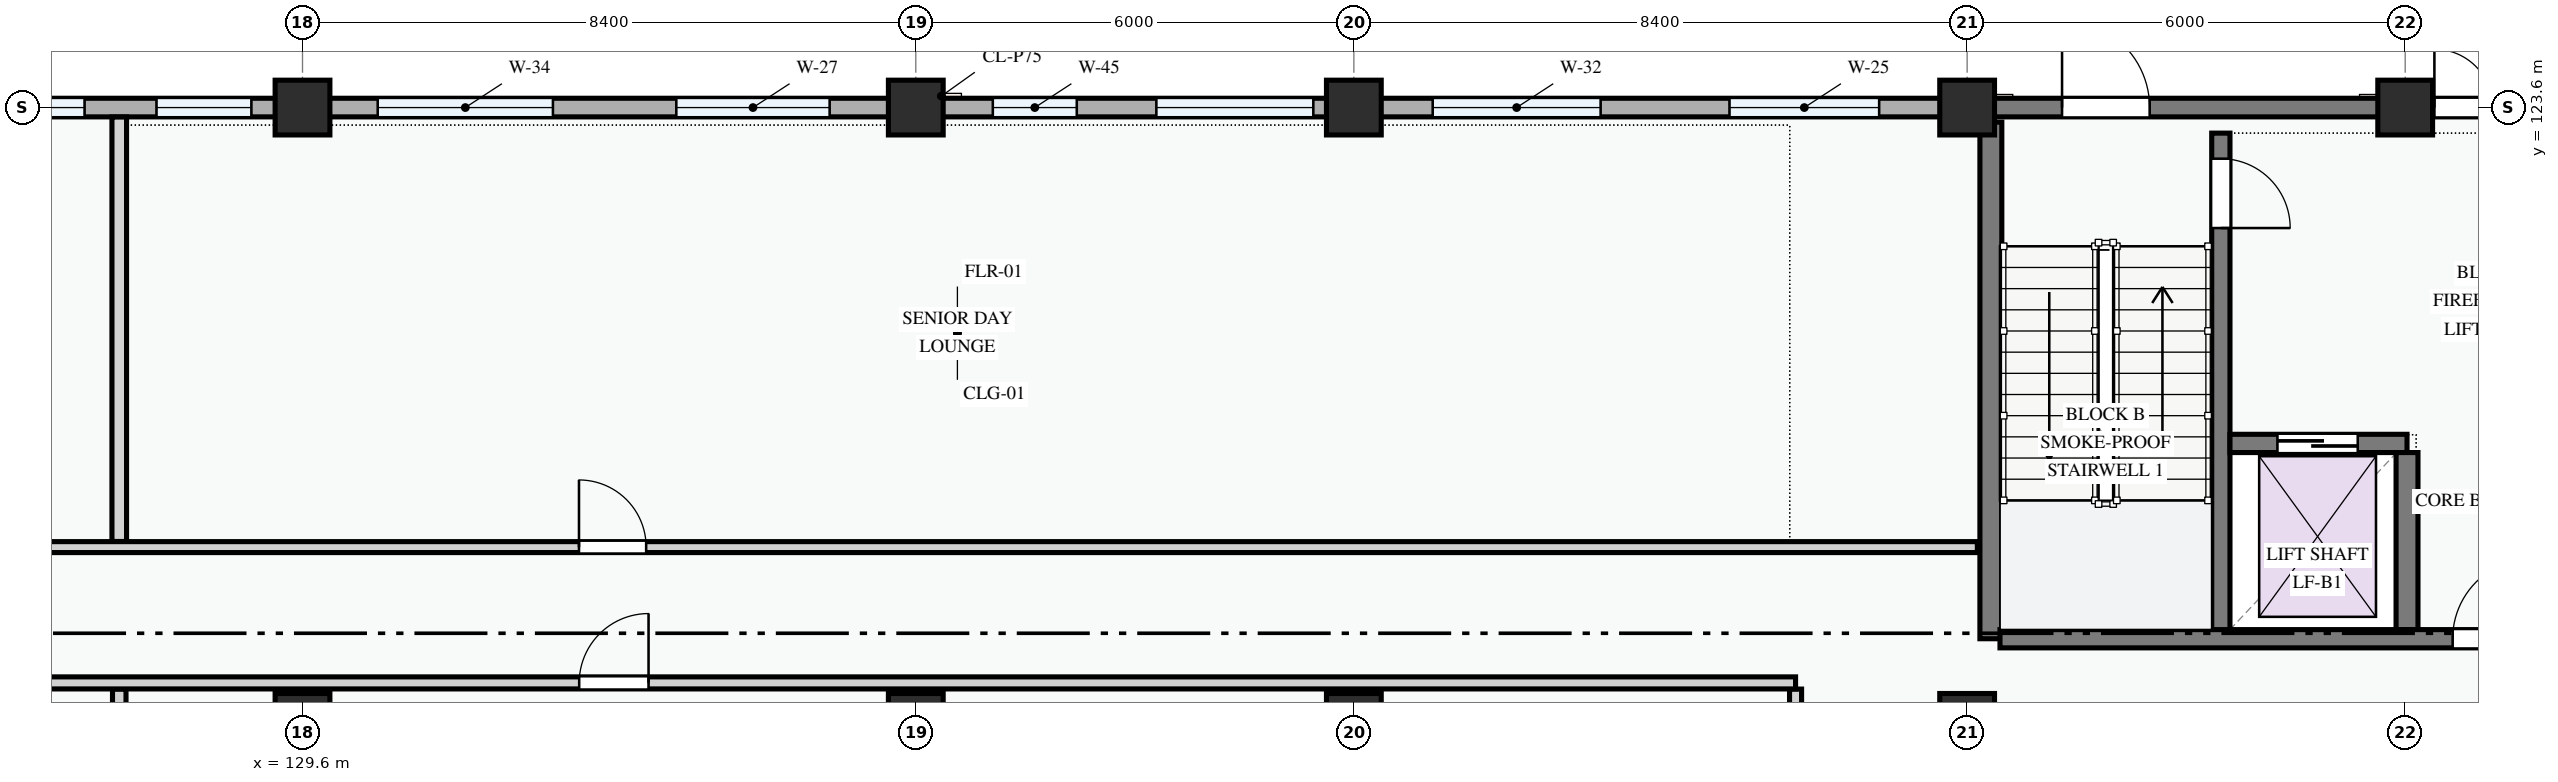
"""IFC4 building model, lengths in metres.
Left out: names, types, materials, properties, quantities, classifications, styles, units other than length and angle.
Written with IfcOpenShell. Run it as: python <this file> out.ifc"""

import sys

from ifc_helpers import new_model, si_unit, direction, frame, frame_2d, origin, origin_2d, place, context, subcontext, project, spatial, rectangle, extrude, element, fill, save


model = new_model("IFC4")
c1 = context("Model", 3, precision=1e-05, world=origin(), true_north=direction((0.0, 1.0)))
c2 = subcontext(c1, "Body", "Model", "MODEL_VIEW")
j1 = project(units=[si_unit("LENGTHUNIT", "METRE"), si_unit("PLANEANGLEUNIT", "RADIAN")], contexts=[c1])
p1 = place(None, origin())
s1 = spatial("IfcSite", under=j1, at=p1, CompositionType="ELEMENT")
p2 = place(p1, origin())
s2 = spatial("IfcBuilding", under=s1, at=p2, CompositionType="ELEMENT")
p3 = place(p2, origin())
s3 = spatial("IfcBuildingStorey", under=s2, at=p3, CompositionType="ELEMENT", Elevation=0.0)
for number, where, z_axis, x_axis in (
    (1, (129.6, 115.2, 0.0), (0.0, 0.0, 1.0), (1.0, 0.0, 0.0)),
    (2, (129.6, 123.6, 0.0), (0.0, 0.0, 1.0), (1.0, 0.0, 0.0)),
    (3, (138.0, 115.2, 0.0), (0.0, 0.0, 1.0), (1.0, 0.0, 0.0)),
    (4, (138.0, 123.6, 0.0), (0.0, 0.0, 1.0), (1.0, 0.0, 0.0)),
    (5, (144.0, 115.2, 0.0), (0.0, 0.0, 1.0), (1.0, 0.0, 0.0)),
    (6, (144.0, 123.6, 0.0), (0.0, 0.0, 1.0), (1.0, 0.0, 0.0)),
    (7, (152.4, 115.2, 0.0), (0.0, 0.0, 1.0), (1.0, 0.0, 0.0)),
    (8, (152.4, 123.6, 0.0), (0.0, 0.0, 1.0), (1.0, 0.0, 0.0)),
    (9, (158.4, 123.6, 0.0), (0.0, 0.0, 1.0), (1.0, 0.0, 0.0)),
):
    element("IfcColumn", number, at=place(p3, frame(where, z_axis=z_axis, x_axis=x_axis)), inside=s3, PredefinedType="COLUMN", context=c2, shape_type="SweptSolid", body=[
        extrude(rectangle(XDim=0.75, YDim=0.75, at=origin_2d()), origin(), (0.0, 0.0, 1.0), 4.5),
    ])
p4 = place(p3, frame((166.8, 123.6, 0.0), z_axis=(0.0, 0.0, 1.0), x_axis=(-1.0, 0.0, 0.0)))
e10 = element("IfcWall", 10, at=p4, inside=s3, PredefinedType="STANDARD", context=c2, shape_type="SweptSolid", body=[
    extrude(rectangle(XDim=8.4, YDim=0.255, at=frame_2d((4.2, 0.0))), origin(), (0.0, 0.0, 1.0), 4.2),
])
p5 = place(p4, frame((6.4, 0.0, 0.0)))
e11 = element("IfcOpeningElement", 11, at=p5, cuts=e10, PredefinedType="OPENING", context=c2, shape_type="SweptSolid", body=[
    extrude(rectangle(XDim=1.6, YDim=2.35, at=frame_2d((0.8, 1.175))), frame((0.0, 0.137, 0.0), z_axis=(0.0, -1.0, 0.0), x_axis=(1.0, 0.0, 0.0)), (0.0, 0.0, 1.0), 0.275),
])
p6 = place(p4, frame((1.25, 0.0, 0.0)))
e12 = element("IfcOpeningElement", 12, at=p6, cuts=e10, PredefinedType="OPENING", context=c2, shape_type="SweptSolid", body=[
    extrude(rectangle(XDim=1.3, YDim=2.2, at=frame_2d((0.65, 1.1))), frame((0.0, 0.137, 0.0), z_axis=(0.0, -1.0, 0.0), x_axis=(1.0, 0.0, 0.0)), (0.0, 0.0, 1.0), 0.275),
])
p7 = place(p3, frame((158.4, 123.6, 0.0), z_axis=(0.0, 0.0, 1.0), x_axis=(-1.0, 0.0, 0.0)))
e13 = element("IfcWall", 13, at=p7, inside=s3, PredefinedType="STANDARD", context=c2, shape_type="SweptSolid", body=[
    extrude(rectangle(XDim=6.0, YDim=0.255, at=frame_2d((3.0, 0.0))), origin(), (0.0, 0.0, 1.0), 4.2),
])
p8 = place(p7, frame((3.5, 0.0, 0.0)))
e14 = element("IfcOpeningElement", 14, at=p8, cuts=e13, PredefinedType="OPENING", context=c2, shape_type="SweptSolid", body=[
    extrude(rectangle(XDim=1.2, YDim=2.2, at=frame_2d((0.6, 1.1))), frame((0.0, 0.137, 0.0), z_axis=(0.0, -1.0, 0.0), x_axis=(1.0, 0.0, 0.0)), (0.0, 0.0, 1.0), 0.275),
])
p9 = place(p3, frame((152.4, 123.6, 0.0), z_axis=(0.0, 0.0, 1.0), x_axis=(-1.0, 0.0, 0.0)))
e15 = element("IfcWall", 15, at=p9, inside=s3, PredefinedType="STANDARD", context=c2, shape_type="SweptSolid", body=[
    extrude(rectangle(XDim=8.4, YDim=0.255, at=frame_2d((4.2, 0.0))), origin(), (0.0, 0.0, 1.0), 3.485),
])
p10 = place(p9, frame((1.205, 0.0, 0.78)))
e16 = element("IfcOpeningElement", 16, at=p10, cuts=e15, PredefinedType="OPENING", context=c2, shape_type="SweptSolid", body=[
    extrude(rectangle(XDim=2.05, YDim=1.6, at=frame_2d((1.025, 0.8))), frame((0.0, 0.137, 0.0), z_axis=(0.0, -1.0, 0.0), x_axis=(1.0, 0.0, 0.0)), (0.0, 0.0, 1.0), 0.275),
])
p11 = place(p9, frame((5.02, 0.0, 0.78)))
e17 = element("IfcOpeningElement", 17, at=p11, cuts=e15, PredefinedType="OPENING", context=c2, shape_type="SweptSolid", body=[
    extrude(rectangle(XDim=2.3, YDim=1.7, at=frame_2d((1.15, 0.85))), frame((0.0, 0.137, 0.0), z_axis=(0.0, -1.0, 0.0), x_axis=(1.0, 0.0, 0.0)), (0.0, 0.0, 1.0), 0.275),
])
p12 = place(p3, frame((144.0, 123.6, 0.0), z_axis=(0.0, 0.0, 1.0), x_axis=(-1.0, 0.0, 0.0)))
e18 = element("IfcWall", 18, at=p12, inside=s3, PredefinedType="STANDARD", context=c2, shape_type="SweptSolid", body=[
    extrude(rectangle(XDim=6.0, YDim=0.255, at=frame_2d((3.0, 0.0))), origin(), (0.0, 0.0, 1.0), 3.585),
])
p13 = place(p12, frame((0.555, 0.0, 0.78)))
e19 = element("IfcOpeningElement", 19, at=p13, cuts=e18, PredefinedType="OPENING", context=c2, shape_type="SweptSolid", body=[
    extrude(rectangle(XDim=2.15, YDim=1.65, at=frame_2d((1.075, 0.825))), frame((0.0, 0.137, 0.0), z_axis=(0.0, -1.0, 0.0), x_axis=(1.0, 0.0, 0.0)), (0.0, 0.0, 1.0), 0.275),
])
p14 = place(p12, frame((3.795, 0.0, 0.78)))
e20 = element("IfcOpeningElement", 20, at=p14, cuts=e18, PredefinedType="OPENING", context=c2, shape_type="SweptSolid", body=[
    extrude(rectangle(XDim=1.15, YDim=1.25, at=frame_2d((0.575, 0.625))), frame((0.0, 0.137, 0.0), z_axis=(0.0, -1.0, 0.0), x_axis=(1.0, 0.0, 0.0)), (0.0, 0.0, 1.0), 0.275),
])
p15 = place(p3, frame((138.0, 123.6, 0.0), z_axis=(0.0, 0.0, 1.0), x_axis=(-1.0, 0.0, 0.0)))
e21 = element("IfcWall", 21, at=p15, inside=s3, PredefinedType="STANDARD", context=c2, shape_type="SweptSolid", body=[
    extrude(rectangle(XDim=8.4, YDim=0.255, at=frame_2d((4.2, 0.0))), origin(), (0.0, 0.0, 1.0), 3.485),
])
p16 = place(p15, frame((1.18, 0.0, 0.78)))
e22 = element("IfcOpeningElement", 22, at=p16, cuts=e21, PredefinedType="OPENING", context=c2, shape_type="SweptSolid", body=[
    extrude(rectangle(XDim=2.1, YDim=1.8, at=frame_2d((1.05, 0.9))), frame((0.0, 0.137, 0.0), z_axis=(0.0, -1.0, 0.0), x_axis=(1.0, 0.0, 0.0)), (0.0, 0.0, 1.0), 0.275),
])
p17 = place(p15, frame((4.97, 0.0, 0.78)))
e23 = element("IfcOpeningElement", 23, at=p17, cuts=e21, PredefinedType="OPENING", context=c2, shape_type="SweptSolid", body=[
    extrude(rectangle(XDim=2.4, YDim=1.65, at=frame_2d((1.2, 0.825))), frame((0.0, 0.137, 0.0), z_axis=(0.0, -1.0, 0.0), x_axis=(1.0, 0.0, 0.0)), (0.0, 0.0, 1.0), 0.275),
])
p18 = place(p3, frame((129.6, 123.6, 0.0), z_axis=(0.0, 0.0, 1.0), x_axis=(-1.0, 0.0, 0.0)))
e24 = element("IfcWall", 24, at=p18, inside=s3, PredefinedType="STANDARD", context=c2, shape_type="SweptSolid", body=[
    extrude(rectangle(XDim=6.0, YDim=0.255, at=frame_2d((3.0, 0.0))), origin(), (0.0, 0.0, 1.0), 3.585),
])
p19 = place(p18, frame((0.7, 0.0, 0.78)))
e25 = element("IfcOpeningElement", 25, at=p19, cuts=e24, PredefinedType="OPENING", context=c2, shape_type="SweptSolid", body=[
    extrude(rectangle(XDim=1.3, YDim=1.4, at=frame_2d((0.65, 0.7))), frame((0.0, 0.137, 0.0), z_axis=(0.0, -1.0, 0.0), x_axis=(1.0, 0.0, 0.0)), (0.0, 0.0, 1.0), 0.275),
])
p20 = place(p18, frame((2.985, 0.0, 0.78)))
e26 = element("IfcOpeningElement", 26, at=p20, cuts=e24, PredefinedType="OPENING", context=c2, shape_type="SweptSolid", body=[
    extrude(rectangle(XDim=2.35, YDim=1.55, at=frame_2d((1.175, 0.775))), frame((0.0, 0.137, 0.0), z_axis=(0.0, -1.0, 0.0), x_axis=(1.0, 0.0, 0.0)), (0.0, 0.0, 1.0), 0.275),
])
p21 = place(p3, frame((155.875, 123.25, 0.0), z_axis=(0.0, 0.0, 1.0), x_axis=(0.0, -1.0, 0.0)))
e27 = element("IfcWall", 27, at=p21, inside=s3, PredefinedType="SHEAR", context=c2, shape_type="SweptSolid", body=[
    extrude(rectangle(XDim=6.925, YDim=0.25, at=frame_2d((3.462, 0.0))), origin(), (0.0, 0.0, 1.0), 4.2),
])
p22 = place(p21, frame((0.35, 0.0, 0.0)))
e28 = element("IfcOpeningElement", 28, at=p22, cuts=e27, PredefinedType="OPENING", context=c2, shape_type="SweptSolid", body=[
    extrude(rectangle(XDim=0.95, YDim=2.1, at=frame_2d((0.475, 1.05))), frame((0.0, 0.135, 0.0), z_axis=(0.0, -1.0, 0.0), x_axis=(1.0, 0.0, 0.0)), (0.0, 0.0, 1.0), 0.27),
])
p23 = place(p3, frame((152.725, 123.4, 0.0), z_axis=(0.0, 0.0, 1.0), x_axis=(0.0, -1.0, 0.0)))
e29 = element("IfcWall", 29, at=p23, inside=s3, PredefinedType="SHEAR", context=c2, shape_type="SweptSolid", body=[
    extrude(rectangle(XDim=7.075, YDim=0.3, at=frame_2d((3.538, 0.0))), origin(), (0.0, 0.0, 1.0), 4.2),
])
p24 = place(p3, frame((156.0, 119.0, 0.0), z_axis=(0.0, 0.0, 1.0), x_axis=(1.0, 0.0, 0.0)))
e30 = element("IfcWall", 30, at=p24, inside=s3, PredefinedType="SHEAR", context=c2, shape_type="SweptSolid", body=[
    extrude(rectangle(XDim=2.425, YDim=0.25, at=frame_2d((1.212, 0.0))), origin(), (0.0, 0.0, 1.0), 4.2),
])
p25 = place(p24, frame((0.65, 0.0, 0.0)))
e31 = element("IfcOpeningElement", 31, at=p25, cuts=e30, PredefinedType="OPENING", context=c2, shape_type="SweptSolid", body=[
    extrude(rectangle(XDim=1.1, YDim=2.15, at=frame_2d((0.55, 1.075))), frame((0.0, 0.135, 0.0), z_axis=(0.0, -1.0, 0.0), x_axis=(1.0, 0.0, 0.0)), (0.0, 0.0, 1.0), 0.27),
])
p26 = place(p3, frame((158.425, 118.875, 0.0), z_axis=(0.0, 0.0, 1.0), x_axis=(0.0, -1.0, 0.0)))
e32 = element("IfcWall", 32, at=p26, inside=s3, PredefinedType="SHEAR", context=c2, shape_type="SweptSolid", body=[
    extrude(rectangle(XDim=2.425, YDim=0.3, at=frame_2d((1.212, 0.0))), origin(), (0.0, 0.0, 1.0), 4.2),
])
p27 = place(p3, frame((152.85, 116.325, 0.0), z_axis=(0.0, 0.0, 1.0), x_axis=(1.0, 0.0, 0.0)))
e33 = element("IfcWall", 33, at=p27, inside=s3, PredefinedType="SHEAR", context=c2, shape_type="SweptSolid", body=[
    extrude(rectangle(XDim=13.5, YDim=0.25, at=frame_2d((6.75, 0.0))), origin(), (0.0, 0.0, 1.0), 4.2),
])
p28 = place(p27, frame((6.2, 0.0, 0.0)))
e34 = element("IfcOpeningElement", 34, at=p28, cuts=e33, PredefinedType="OPENING", context=c2, shape_type="SweptSolid", body=[
    extrude(rectangle(XDim=1.1, YDim=2.15, at=frame_2d((0.55, 1.075))), frame((0.0, 0.135, 0.0), z_axis=(0.0, -1.0, 0.0), x_axis=(1.0, 0.0, 0.0)), (0.0, 0.0, 1.0), 0.27),
])
p29 = place(p3, frame((150.05, 109.33, 0.0), z_axis=(0.0, 0.0, 1.0), x_axis=(0.0, 1.0, 0.0)))
e35 = element("IfcWall", 35, at=p29, inside=s3, PredefinedType="PARTITIONING", context=c2, shape_type="SweptSolid", body=[
    extrude(rectangle(XDim=6.306, YDim=0.165, at=frame_2d((3.153, 0.0))), origin(), (0.0, 0.0, 1.0), 4.2),
])
p30 = place(p3, frame((127.09, 109.33, 0.0), z_axis=(0.0, 0.0, 1.0), x_axis=(0.0, 1.0, 0.0)))
e36 = element("IfcWall", 36, at=p30, inside=s3, PredefinedType="PARTITIONING", context=c2, shape_type="SweptSolid", body=[
    extrude(rectangle(XDim=6.306, YDim=0.185, at=frame_2d((3.153, 0.0))), origin(), (0.0, 0.0, 1.0), 4.2),
])
p31 = place(p3, frame((127.09, 117.657, 0.0), z_axis=(0.0, 0.0, 1.0), x_axis=(0.0, 1.0, 0.0)))
e37 = element("IfcWall", 37, at=p31, inside=s3, PredefinedType="PARTITIONING", context=c2, shape_type="SweptSolid", body=[
    extrude(rectangle(XDim=5.813, YDim=0.2, at=frame_2d((2.907, 0.0))), origin(), (0.0, 0.0, 1.0), 4.2),
])
p32 = place(p3, frame((80.53, 115.72, 0.0), z_axis=(0.0, 0.0, 1.0), x_axis=(1.0, 0.0, 0.0)))
e38 = element("IfcWall", 38, at=p32, inside=s3, PredefinedType="PARTITIONING", context=c2, shape_type="SweptSolid", body=[
    extrude(rectangle(XDim=69.521, YDim=0.165, at=frame_2d((34.76, 0.0))), origin(), (0.0, 0.0, 1.0), 4.2),
])
p33 = place(p32, frame((9.591, 0.0, 0.0)))
e39 = element("IfcOpeningElement", 39, at=p33, cuts=e38, PredefinedType="OPENING", context=c2, shape_type="SweptSolid", body=[
    extrude(rectangle(XDim=0.95, YDim=2.1, at=frame_2d((0.475, 1.05))), frame((0.0, 0.093, 0.0), z_axis=(0.0, -1.0, 0.0), x_axis=(1.0, 0.0, 0.0)), (0.0, 0.0, 1.0), 0.185),
])
p34 = place(p32, frame((38.417, 0.0, 0.0)))
e40 = element("IfcOpeningElement", 40, at=p34, cuts=e38, PredefinedType="OPENING", context=c2, shape_type="SweptSolid", body=[
    extrude(rectangle(XDim=0.95, YDim=2.1, at=frame_2d((0.475, 1.05))), frame((0.0, 0.093, 0.0), z_axis=(0.0, -1.0, 0.0), x_axis=(1.0, 0.0, 0.0)), (0.0, 0.0, 1.0), 0.185),
])
p35 = place(p32, frame((52.86, 0.0, 0.0)))
e41 = element("IfcOpeningElement", 41, at=p35, cuts=e38, PredefinedType="OPENING", context=c2, shape_type="SweptSolid", body=[
    extrude(rectangle(XDim=0.95, YDim=2.1, at=frame_2d((0.475, 1.05))), frame((0.0, 0.093, 0.0), z_axis=(0.0, -1.0, 0.0), x_axis=(1.0, 0.0, 0.0)), (0.0, 0.0, 1.0), 0.185),
])
p36 = place(p3, frame((80.53, 117.58, 0.0), z_axis=(0.0, 0.0, 1.0), x_axis=(1.0, 0.0, 0.0)))
e42 = element("IfcWall", 42, at=p36, inside=s3, PredefinedType="PARTITIONING", context=c2, shape_type="SweptSolid", body=[
    extrude(rectangle(XDim=72.01, YDim=0.15, at=frame_2d((36.005, 0.0))), origin(), (0.0, 0.0, 1.0), 4.2),
])
p37 = place(p36, frame((9.587, 0.0, 0.0)))
e43 = element("IfcOpeningElement", 43, at=p37, cuts=e42, PredefinedType="OPENING", context=c2, shape_type="SweptSolid", body=[
    extrude(rectangle(XDim=0.96, YDim=2.12, at=frame_2d((0.48, 1.06))), frame((0.0, 0.085, 0.0), z_axis=(0.0, -1.0, 0.0), x_axis=(1.0, 0.0, 0.0)), (0.0, 0.0, 1.0), 0.17),
])
p38 = place(p36, frame((38.41, 0.0, 0.0)))
e44 = element("IfcOpeningElement", 44, at=p38, cuts=e42, PredefinedType="OPENING", context=c2, shape_type="SweptSolid", body=[
    extrude(rectangle(XDim=0.92, YDim=2.1, at=frame_2d((0.46, 1.05))), frame((0.0, 0.085, 0.0), z_axis=(0.0, -1.0, 0.0), x_axis=(1.0, 0.0, 0.0)), (0.0, 0.0, 1.0), 0.17),
])
p39 = place(p36, frame((52.857, 0.0, 0.0)))
e45 = element("IfcOpeningElement", 45, at=p39, cuts=e42, PredefinedType="OPENING", context=c2, shape_type="SweptSolid", body=[
    extrude(rectangle(XDim=0.92, YDim=2.1, at=frame_2d((0.46, 1.05))), frame((0.0, 0.085, 0.0), z_axis=(0.0, -1.0, 0.0), x_axis=(1.0, 0.0, 0.0)), (0.0, 0.0, 1.0), 0.17),
])
p40 = place(p5, frame((1.6, 0.0, 0.0), z_axis=(0.0, 0.0, 1.0), x_axis=(-1.0, 0.0, 0.0)))
e46 = element("IfcDoor", 46, at=p40, inside=s3, OperationType="DOUBLE_DOOR_SINGLE_SWING", PredefinedType="DOOR", context=c2, shape_type="SweptSolid", body=[
    extrude(rectangle(XDim=1.6, YDim=2.35, at=frame_2d((0.8, 1.175))), frame((0.0, 0.025, 0.0), z_axis=(0.0, -1.0, 0.0), x_axis=(1.0, 0.0, 0.0)), (0.0, 0.0, 1.0), 0.05),
])
fill(e11, e46)
p41 = place(p8, frame((1.2, 0.0, 0.0), z_axis=(0.0, 0.0, 1.0), x_axis=(-1.0, 0.0, 0.0)))
e47 = element("IfcDoor", 47, at=p41, inside=s3, OperationType="SINGLE_SWING_LEFT", PredefinedType="DOOR", context=c2, shape_type="SweptSolid", body=[
    extrude(rectangle(XDim=1.2, YDim=2.2, at=frame_2d((0.6, 1.1))), frame((0.0, 0.025, 0.0), z_axis=(0.0, -1.0, 0.0), x_axis=(1.0, 0.0, 0.0)), (0.0, 0.0, 1.0), 0.05),
])
fill(e14, e47)
p42 = place(p10, origin())
e48 = element("IfcWindow", 48, at=p42, inside=s3, PartitioningType="DOUBLE_PANEL_VERTICAL", PredefinedType="WINDOW", context=c2, shape_type="SweptSolid", body=[
    extrude(rectangle(XDim=2.05, YDim=1.6, at=frame_2d((1.025, 0.8))), frame((0.0, 0.03, 0.0), z_axis=(0.0, -1.0, 0.0), x_axis=(1.0, 0.0, 0.0)), (0.0, 0.0, 1.0), 0.06),
])
fill(e16, e48)
p43 = place(p11, origin())
e49 = element("IfcWindow", 49, at=p43, inside=s3, PartitioningType="DOUBLE_PANEL_VERTICAL", PredefinedType="WINDOW", context=c2, shape_type="SweptSolid", body=[
    extrude(rectangle(XDim=2.3, YDim=1.7, at=frame_2d((1.15, 0.85))), frame((0.0, 0.03, 0.0), z_axis=(0.0, -1.0, 0.0), x_axis=(1.0, 0.0, 0.0)), (0.0, 0.0, 1.0), 0.06),
])
fill(e17, e49)
p44 = place(p13, origin())
e50 = element("IfcWindow", 50, at=p44, inside=s3, PartitioningType="DOUBLE_PANEL_VERTICAL", PredefinedType="WINDOW", context=c2, shape_type="SweptSolid", body=[
    extrude(rectangle(XDim=2.15, YDim=1.65, at=frame_2d((1.075, 0.825))), frame((0.0, 0.03, 0.0), z_axis=(0.0, -1.0, 0.0), x_axis=(1.0, 0.0, 0.0)), (0.0, 0.0, 1.0), 0.06),
])
fill(e19, e50)
p45 = place(p14, origin())
e51 = element("IfcWindow", 51, at=p45, inside=s3, PartitioningType="SINGLE_PANEL", PredefinedType="WINDOW", context=c2, shape_type="SweptSolid", body=[
    extrude(rectangle(XDim=1.15, YDim=1.25, at=frame_2d((0.575, 0.625))), frame((0.0, 0.03, 0.0), z_axis=(0.0, -1.0, 0.0), x_axis=(1.0, 0.0, 0.0)), (0.0, 0.0, 1.0), 0.06),
])
fill(e20, e51)
p46 = place(p16, origin())
e52 = element("IfcWindow", 52, at=p46, inside=s3, PartitioningType="DOUBLE_PANEL_VERTICAL", PredefinedType="WINDOW", context=c2, shape_type="SweptSolid", body=[
    extrude(rectangle(XDim=2.1, YDim=1.8, at=frame_2d((1.05, 0.9))), frame((0.0, 0.03, 0.0), z_axis=(0.0, -1.0, 0.0), x_axis=(1.0, 0.0, 0.0)), (0.0, 0.0, 1.0), 0.06),
])
fill(e22, e52)
p47 = place(p17, origin())
e53 = element("IfcWindow", 53, at=p47, inside=s3, PartitioningType="DOUBLE_PANEL_VERTICAL", PredefinedType="WINDOW", context=c2, shape_type="SweptSolid", body=[
    extrude(rectangle(XDim=2.4, YDim=1.65, at=frame_2d((1.2, 0.825))), frame((0.0, 0.03, 0.0), z_axis=(0.0, -1.0, 0.0), x_axis=(1.0, 0.0, 0.0)), (0.0, 0.0, 1.0), 0.06),
])
fill(e23, e53)
p48 = place(p19, origin())
e54 = element("IfcWindow", 54, at=p48, inside=s3, PartitioningType="SINGLE_PANEL", PredefinedType="WINDOW", context=c2, shape_type="SweptSolid", body=[
    extrude(rectangle(XDim=1.3, YDim=1.4, at=frame_2d((0.65, 0.7))), frame((0.0, 0.03, 0.0), z_axis=(0.0, -1.0, 0.0), x_axis=(1.0, 0.0, 0.0)), (0.0, 0.0, 1.0), 0.06),
])
fill(e25, e54)
p49 = place(p20, origin())
e55 = element("IfcWindow", 55, at=p49, inside=s3, PartitioningType="DOUBLE_PANEL_VERTICAL", PredefinedType="WINDOW", context=c2, shape_type="SweptSolid", body=[
    extrude(rectangle(XDim=2.35, YDim=1.55, at=frame_2d((1.175, 0.775))), frame((0.0, 0.03, 0.0), z_axis=(0.0, -1.0, 0.0), x_axis=(1.0, 0.0, 0.0)), (0.0, 0.0, 1.0), 0.06),
])
fill(e26, e55)
p50 = place(p22, origin())
e56 = element("IfcDoor", 56, at=p50, inside=s3, OperationType="SINGLE_SWING_RIGHT", PredefinedType="DOOR", context=c2, shape_type="SweptSolid", body=[
    extrude(rectangle(XDim=0.95, YDim=2.1, at=frame_2d((0.475, 1.05))), frame((0.0, 0.025, 0.0), z_axis=(0.0, -1.0, 0.0), x_axis=(1.0, 0.0, 0.0)), (0.0, 0.0, 1.0), 0.05),
])
fill(e28, e56)
p51 = place(p25, origin())
e57 = element("IfcDoor", 57, at=p51, inside=s3, OperationType="SLIDING_TO_LEFT", PredefinedType="DOOR", context=c2, shape_type="SweptSolid", body=[
    extrude(rectangle(XDim=1.1, YDim=2.15, at=frame_2d((0.55, 1.075))), frame((0.0, 0.025, 0.0), z_axis=(0.0, -1.0, 0.0), x_axis=(1.0, 0.0, 0.0)), (0.0, 0.0, 1.0), 0.05),
])
fill(e31, e57)
p52 = place(p28, origin())
e58 = element("IfcDoor", 58, at=p52, inside=s3, OperationType="SINGLE_SWING_RIGHT", PredefinedType="DOOR", context=c2, shape_type="SweptSolid", body=[
    extrude(rectangle(XDim=1.1, YDim=2.15, at=frame_2d((0.55, 1.075))), frame((0.0, 0.025, 0.0), z_axis=(0.0, -1.0, 0.0), x_axis=(1.0, 0.0, 0.0)), (0.0, 0.0, 1.0), 0.05),
])
fill(e34, e58)
p53 = place(p35, origin())
e59 = element("IfcDoor", 59, at=p53, inside=s3, OperationType="SINGLE_SWING_RIGHT", PredefinedType="DOOR", context=c2, shape_type="SweptSolid", body=[
    extrude(rectangle(XDim=0.95, YDim=2.1, at=frame_2d((0.475, 1.05))), frame((0.0, 0.025, 0.0), z_axis=(0.0, -1.0, 0.0), x_axis=(1.0, 0.0, 0.0)), (0.0, 0.0, 1.0), 0.05),
])
fill(e41, e59)
p54 = place(p39, origin())
e60 = element("IfcDoor", 60, at=p54, inside=s3, OperationType="SINGLE_SWING_LEFT", PredefinedType="DOOR", context=c2, shape_type="SweptSolid", body=[
    extrude(rectangle(XDim=0.92, YDim=2.1, at=frame_2d((0.46, 1.05))), frame((0.0, 0.025, 0.0), z_axis=(0.0, -1.0, 0.0), x_axis=(1.0, 0.0, 0.0)), (0.0, 0.0, 1.0), 0.05),
])
fill(e45, e60)
save(model, sys.argv[1])
